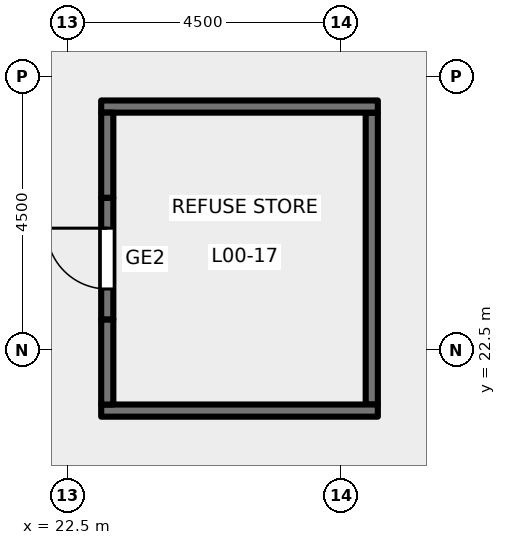
"""IFC4 building model, lengths in metres.
Left out: names, types, materials, properties, quantities, classifications, styles, units other than length and angle.
Written with IfcOpenShell. Run it as: python <this file> out.ifc"""

import sys

from ifc_helpers import new_model, si_unit, direction, frame, frame_2d, origin, place, context, subcontext, project, spatial, rectangle, extrude, element, fill, save


model = new_model("IFC4")
c1 = context("Model", 3, precision=1e-05, world=origin(), true_north=direction((0.0, 1.0)))
c2 = subcontext(c1, "Body", "Model", "MODEL_VIEW")
j1 = project(units=[si_unit("LENGTHUNIT", "METRE"), si_unit("PLANEANGLEUNIT", "RADIAN")], contexts=[c1])
p1 = place(None, origin())
s1 = spatial("IfcSite", under=j1, at=p1, CompositionType="ELEMENT")
p2 = place(p1, origin())
s2 = spatial("IfcBuilding", under=s1, at=p2, CompositionType="ELEMENT")
p3 = place(p2, origin())
s3 = spatial("IfcBuildingStorey", under=s2, at=p3, CompositionType="ELEMENT", Elevation=0.0)
p4 = place(p3, frame((23.05, 21.5, 0.0), z_axis=(0.0, 0.0, 1.0), x_axis=(1.0, 0.0, 0.0)))
e1 = element("IfcWall", 1, at=p4, inside=s3, PredefinedType="SOLIDWALL", context=c2, shape_type="SweptSolid", body=[
    extrude(rectangle(XDim=4.55, YDim=0.2, at=frame_2d((2.275, 0.0))), origin(), (0.0, 0.0, 1.0), 4.3),
])
p5 = place(p3, frame((27.5, 21.6, 0.0), z_axis=(0.0, 0.0, 1.0), x_axis=(0.0, 1.0, 0.0)))
e2 = element("IfcWall", 2, at=p5, inside=s3, PredefinedType="SOLIDWALL", context=c2, shape_type="SweptSolid", body=[
    extrude(rectangle(XDim=4.8, YDim=0.2, at=frame_2d((2.4, 0.0))), origin(), (0.0, 0.0, 1.0), 4.3),
])
p6 = place(p3, frame((23.05, 26.5, 0.0), z_axis=(0.0, 0.0, 1.0), x_axis=(1.0, 0.0, 0.0)))
e3 = element("IfcWall", 3, at=p6, inside=s3, PredefinedType="SOLIDWALL", context=c2, shape_type="SweptSolid", body=[
    extrude(rectangle(XDim=4.55, YDim=0.2, at=frame_2d((2.275, 0.0))), origin(), (0.0, 0.0, 1.0), 4.3),
])
p7 = place(p3, frame((23.15, 21.6, 0.0), z_axis=(0.0, 0.0, 1.0), x_axis=(0.0, 1.0, 0.0)))
e4 = element("IfcWall", 4, at=p7, inside=s3, PredefinedType="SOLIDWALL", context=c2, shape_type="SweptSolid", body=[
    extrude(rectangle(XDim=1.4, YDim=0.2, at=frame_2d((0.7, 0.0))), origin(), (0.0, 0.0, 1.0), 4.3),
])
p8 = place(p3, frame((23.15, 23.0, 0.0), z_axis=(0.0, 0.0, 1.0), x_axis=(0.0, 1.0, 0.0)))
e5 = element("IfcWall", 5, at=p8, inside=s3, PredefinedType="SOLIDWALL", context=c2, shape_type="SweptSolid", body=[
    extrude(rectangle(XDim=2.0, YDim=0.2, at=frame_2d((1.0, 0.0))), origin(), (0.0, 0.0, 1.0), 4.3),
])
p9 = place(p8, frame((0.5, 0.0, 0.0)))
e6 = element("IfcOpeningElement", 6, at=p9, cuts=e5, PredefinedType="OPENING", context=c2, shape_type="SweptSolid", body=[
    extrude(rectangle(XDim=1.0, YDim=2.1, at=frame_2d((0.5, 1.05))), frame((0.0, 0.11, 0.0), z_axis=(0.0, -1.0, 0.0), x_axis=(1.0, 0.0, 0.0)), (0.0, 0.0, 1.0), 0.22),
])
p10 = place(p3, frame((23.15, 25.0, 0.0), z_axis=(0.0, 0.0, 1.0), x_axis=(0.0, 1.0, 0.0)))
e7 = element("IfcWall", 7, at=p10, inside=s3, PredefinedType="SOLIDWALL", context=c2, shape_type="SweptSolid", body=[
    extrude(rectangle(XDim=1.4, YDim=0.2, at=frame_2d((0.7, 0.0))), origin(), (0.0, 0.0, 1.0), 4.3),
])
p11 = place(p9, origin())
e8 = element("IfcDoor", 8, at=p11, inside=s3, OperationType="SINGLE_SWING_RIGHT", PredefinedType="DOOR", context=c2, shape_type="SweptSolid", body=[
    extrude(rectangle(XDim=1.0, YDim=2.1, at=frame_2d((0.5, 1.05))), frame((0.0, 0.025, 0.0), z_axis=(0.0, -1.0, 0.0), x_axis=(1.0, 0.0, 0.0)), (0.0, 0.0, 1.0), 0.05),
])
fill(e6, e8)
save(model, sys.argv[1])
